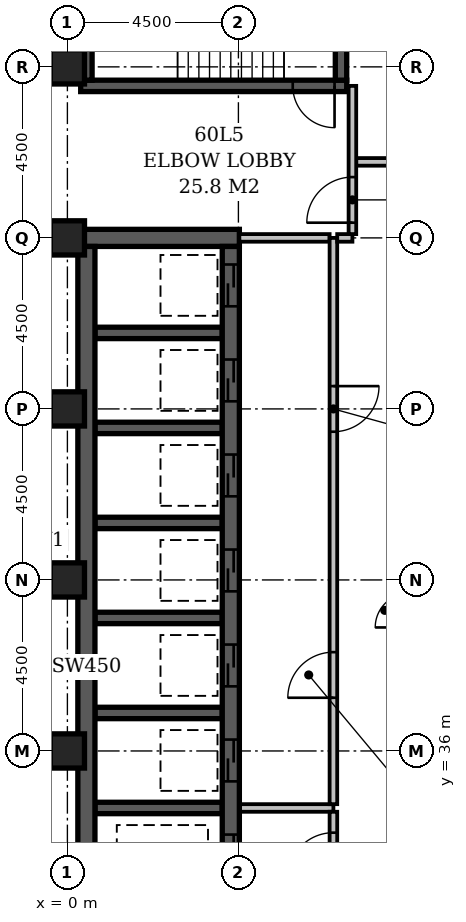
"""IFC4 building model, lengths in metres.
Left out: names, types, materials, properties, quantities, classifications, styles, units other than length and angle.
Written with IfcOpenShell. Run it as: python <this file> out.ifc"""

import sys

from ifc_helpers import new_model, si_unit, direction, frame, frame_2d, origin, origin_2d, place, context, subcontext, project, spatial, rectangle, extrude, element, fill, save


model = new_model("IFC4")
c1 = context("Model", 3, precision=1e-05, world=origin(), true_north=direction((0.0, 1.0)))
c2 = subcontext(c1, "Body", "Model", "MODEL_VIEW")
j1 = project(units=[si_unit("LENGTHUNIT", "METRE"), si_unit("PLANEANGLEUNIT", "RADIAN")], contexts=[c1])
p1 = place(None, origin())
s1 = spatial("IfcSite", under=j1, at=p1, CompositionType="ELEMENT")
p2 = place(p1, origin())
s2 = spatial("IfcBuilding", under=s1, at=p2, CompositionType="ELEMENT")
p3 = place(p2, frame((0.0, 0.0, 233.0)))
s3 = spatial("IfcBuildingStorey", under=s2, at=p3, CompositionType="ELEMENT", Elevation=233.0)
p4 = place(p3, frame((0.275, 49.5, -0.35), z_axis=(0.0, 0.0, 1.0), x_axis=(1.0, 0.0, 0.0)))
e1 = element("IfcWall", 1, at=p4, inside=s3, PredefinedType="SHEAR", context=c2, shape_type="SweptSolid", body=[
    extrude(rectangle(XDim=4.25, YDim=0.45, at=frame_2d((2.125, 0.0))), origin(), (0.0, 0.0, 1.0), 3.65),
])
p5 = place(p3, frame((0.35, 53.5, -0.35), z_axis=(0.0, 0.0, 1.0), x_axis=(1.0, 0.0, 0.0)))
e2 = element("IfcWall", 2, at=p5, inside=s3, PredefinedType="SHEAR", context=c2, shape_type="SweptSolid", body=[
    extrude(rectangle(XDim=7.0, YDim=0.3, at=frame_2d((3.5, 0.0))), origin(), (0.0, 0.0, 1.0), 3.65),
])
p6 = place(p5, frame((5.58, 0.0, 0.35)))
e3 = element("IfcOpeningElement", 3, at=p6, cuts=e2, PredefinedType="OPENING", context=c2, shape_type="SweptSolid", body=[
    extrude(rectangle(XDim=1.1, YDim=2.1, at=frame_2d((0.55, 1.05))), frame((0.0, 0.162, 0.0), z_axis=(0.0, -1.0, 0.0), x_axis=(1.0, 0.0, 0.0)), (0.0, 0.0, 1.0), 0.324),
])
p7 = place(p3, frame((0.5, 27.15, -0.35), z_axis=(0.0, 0.0, 1.0), x_axis=(0.0, 1.0, 0.0)))
e4 = element("IfcWall", 4, at=p7, inside=s3, PredefinedType="SHEAR", context=c2, shape_type="SweptSolid", body=[
    extrude(rectangle(XDim=22.125, YDim=0.45, at=frame_2d((11.062, 0.0))), origin(), (0.0, 0.0, 1.0), 3.65),
])
p8 = place(p3, frame((0.5, 53.65, -0.35), z_axis=(0.0, 0.0, 1.0), x_axis=(0.0, 1.0, 0.0)))
e5 = element("IfcWall", 5, at=p8, inside=s3, PredefinedType="SHEAR", context=c2, shape_type="SweptSolid", body=[
    extrude(rectangle(XDim=4.2, YDim=0.3, at=frame_2d((2.1, 0.0))), origin(), (0.0, 0.0, 1.0), 3.65),
])
for number, where, z_axis, x_axis in (
    (6, (0.725, 34.5, -0.35), (0.0, 0.0, 1.0), (1.0, 0.0, 0.0)),
    (7, (0.725, 37.0, -0.35), (0.0, 0.0, 1.0), (1.0, 0.0, 0.0)),
    (8, (0.725, 39.5, -0.35), (0.0, 0.0, 1.0), (1.0, 0.0, 0.0)),
    (9, (0.725, 42.0, -0.35), (0.0, 0.0, 1.0), (1.0, 0.0, 0.0)),
    (10, (0.725, 44.5, -0.35), (0.0, 0.0, 1.0), (1.0, 0.0, 0.0)),
    (11, (0.725, 47.0, -0.35), (0.0, 0.0, 1.0), (1.0, 0.0, 0.0)),
):
    element("IfcWall", number, at=place(p3, frame(where, z_axis=z_axis, x_axis=x_axis)), inside=s3, PredefinedType="SHEAR", context=c2, shape_type="SweptSolid", body=[
        extrude(rectangle(XDim=3.35, YDim=0.3, at=frame_2d((1.675, 0.0))), origin(), (0.0, 0.0, 1.0), 3.65),
    ])
p9 = place(p3, frame((4.3, 27.15, -0.35), z_axis=(0.0, 0.0, 1.0), x_axis=(0.0, 1.0, 0.0)))
e12 = element("IfcWall", 12, at=p9, inside=s3, PredefinedType="SHEAR", context=c2, shape_type="SweptSolid", body=[
    extrude(rectangle(XDim=22.125, YDim=0.45, at=frame_2d((11.062, 0.0))), origin(), (0.0, 0.0, 1.0), 3.65),
])
p10 = place(p9, frame((3.05, 0.0, 0.35)))
e13 = element("IfcOpeningElement", 13, at=p10, cuts=e12, PredefinedType="OPENING", context=c2, shape_type="SweptSolid", body=[
    extrude(rectangle(XDim=1.1, YDim=2.1, at=frame_2d((0.55, 1.05))), frame((0.0, 0.237, 0.0), z_axis=(0.0, -1.0, 0.0), x_axis=(1.0, 0.0, 0.0)), (0.0, 0.0, 1.0), 0.474),
])
p11 = place(p9, frame((0.55, 0.0, 0.35)))
e14 = element("IfcOpeningElement", 14, at=p11, cuts=e12, PredefinedType="OPENING", context=c2, shape_type="SweptSolid", body=[
    extrude(rectangle(XDim=1.1, YDim=2.1, at=frame_2d((0.55, 1.05))), frame((0.0, 0.237, 0.0), z_axis=(0.0, -1.0, 0.0), x_axis=(1.0, 0.0, 0.0)), (0.0, 0.0, 1.0), 0.474),
])
p12 = place(p9, frame((20.55, 0.0, 0.35)))
e15 = element("IfcOpeningElement", 15, at=p12, cuts=e12, PredefinedType="OPENING", context=c2, shape_type="SweptSolid", body=[
    extrude(rectangle(XDim=1.1, YDim=2.1, at=frame_2d((0.55, 1.05))), frame((0.0, 0.237, 0.0), z_axis=(0.0, -1.0, 0.0), x_axis=(1.0, 0.0, 0.0)), (0.0, 0.0, 1.0), 0.474),
])
p13 = place(p9, frame((18.05, 0.0, 0.35)))
e16 = element("IfcOpeningElement", 16, at=p13, cuts=e12, PredefinedType="OPENING", context=c2, shape_type="SweptSolid", body=[
    extrude(rectangle(XDim=1.1, YDim=2.1, at=frame_2d((0.55, 1.05))), frame((0.0, 0.237, 0.0), z_axis=(0.0, -1.0, 0.0), x_axis=(1.0, 0.0, 0.0)), (0.0, 0.0, 1.0), 0.474),
])
p14 = place(p9, frame((15.55, 0.0, 0.35)))
e17 = element("IfcOpeningElement", 17, at=p14, cuts=e12, PredefinedType="OPENING", context=c2, shape_type="SweptSolid", body=[
    extrude(rectangle(XDim=1.1, YDim=2.1, at=frame_2d((0.55, 1.05))), frame((0.0, 0.237, 0.0), z_axis=(0.0, -1.0, 0.0), x_axis=(1.0, 0.0, 0.0)), (0.0, 0.0, 1.0), 0.474),
])
p15 = place(p9, frame((13.05, 0.0, 0.35)))
e18 = element("IfcOpeningElement", 18, at=p15, cuts=e12, PredefinedType="OPENING", context=c2, shape_type="SweptSolid", body=[
    extrude(rectangle(XDim=1.1, YDim=2.1, at=frame_2d((0.55, 1.05))), frame((0.0, 0.237, 0.0), z_axis=(0.0, -1.0, 0.0), x_axis=(1.0, 0.0, 0.0)), (0.0, 0.0, 1.0), 0.474),
])
p16 = place(p9, frame((10.55, 0.0, 0.35)))
e19 = element("IfcOpeningElement", 19, at=p16, cuts=e12, PredefinedType="OPENING", context=c2, shape_type="SweptSolid", body=[
    extrude(rectangle(XDim=1.1, YDim=2.1, at=frame_2d((0.55, 1.05))), frame((0.0, 0.237, 0.0), z_axis=(0.0, -1.0, 0.0), x_axis=(1.0, 0.0, 0.0)), (0.0, 0.0, 1.0), 0.474),
])
p17 = place(p9, frame((8.05, 0.0, 0.35)))
e20 = element("IfcOpeningElement", 20, at=p17, cuts=e12, PredefinedType="OPENING", context=c2, shape_type="SweptSolid", body=[
    extrude(rectangle(XDim=1.1, YDim=2.1, at=frame_2d((0.55, 1.05))), frame((0.0, 0.237, 0.0), z_axis=(0.0, -1.0, 0.0), x_axis=(1.0, 0.0, 0.0)), (0.0, 0.0, 1.0), 0.474),
])
p18 = place(p9, frame((5.55, 0.0, 0.35)))
e21 = element("IfcOpeningElement", 21, at=p18, cuts=e12, PredefinedType="OPENING", context=c2, shape_type="SweptSolid", body=[
    extrude(rectangle(XDim=1.1, YDim=2.1, at=frame_2d((0.55, 1.05))), frame((0.0, 0.237, 0.0), z_axis=(0.0, -1.0, 0.0), x_axis=(1.0, 0.0, 0.0)), (0.0, 0.0, 1.0), 0.474),
])
p19 = place(p3, frame((7.2, 53.65, -0.35), z_axis=(0.0, 0.0, 1.0), x_axis=(0.0, 1.0, 0.0)))
e22 = element("IfcWall", 22, at=p19, inside=s3, PredefinedType="SHEAR", context=c2, shape_type="SweptSolid", body=[
    extrude(rectangle(XDim=4.2, YDim=0.3, at=frame_2d((2.1, 0.0))), origin(), (0.0, 0.0, 1.0), 3.65),
])
for number, where, z_axis, x_axis in (
    (23, (0.0, 36.0, -0.35), (0.0, 0.0, 1.0), (1.0, 0.0, 0.0)),
    (24, (0.0, 40.5, -0.35), (0.0, 0.0, 1.0), (1.0, 0.0, 0.0)),
    (25, (0.0, 45.0, -0.35), (0.0, 0.0, 1.0), (1.0, 0.0, 0.0)),
    (26, (0.0, 49.5, -0.35), (0.0, 0.0, 1.0), (1.0, 0.0, 0.0)),
    (27, (0.0, 54.0, -0.35), (0.0, 0.0, 1.0), (1.0, 0.0, 0.0)),
):
    element("IfcColumn", number, at=place(p3, frame(where, z_axis=z_axis, x_axis=x_axis)), inside=s3, PredefinedType="COLUMN", context=c2, shape_type="SweptSolid", body=[
        extrude(rectangle(XDim=0.9, YDim=0.9, at=origin_2d()), origin(), (0.0, 0.0, 1.0), 3.65),
    ])
p20 = place(p3, frame((4.545, 34.5, 0.0), z_axis=(0.0, 0.0, 1.0), x_axis=(1.0, 0.0, 0.0)))
e28 = element("IfcWall", 28, at=p20, inside=s3, PredefinedType="PARTITIONING", context=c2, shape_type="SweptSolid", body=[
    extrude(rectangle(XDim=2.455, YDim=0.2, at=frame_2d((1.228, 0.0))), origin(), (0.0, 0.0, 1.0), 3.3),
])
p21 = place(p3, frame((7.0, 34.6, 0.0), z_axis=(0.0, 0.0, 1.0), x_axis=(0.0, 1.0, 0.0)))
e29 = element("IfcWall", 29, at=p21, inside=s3, PredefinedType="PARTITIONING", context=c2, shape_type="SweptSolid", body=[
    extrude(rectangle(XDim=14.9, YDim=0.2, at=frame_2d((7.45, 0.0))), origin(), (0.0, 0.0, 1.0), 3.3),
])
p22 = place(p21, frame((2.8, 0.0, 0.0)))
e30 = element("IfcOpeningElement", 30, at=p22, cuts=e29, PredefinedType="OPENING", context=c2, shape_type="SweptSolid", body=[
    extrude(rectangle(XDim=1.2, YDim=2.1, at=frame_2d((0.6, 1.05))), frame((0.0, 0.112, 0.0), z_axis=(0.0, -1.0, 0.0), x_axis=(1.0, 0.0, 0.0)), (0.0, 0.0, 1.0), 0.224),
])
p23 = place(p21, frame((9.8, 0.0, 0.0)))
e31 = element("IfcOpeningElement", 31, at=p23, cuts=e29, PredefinedType="OPENING", context=c2, shape_type="SweptSolid", body=[
    extrude(rectangle(XDim=1.2, YDim=2.1, at=frame_2d((0.6, 1.05))), frame((0.0, 0.112, 0.0), z_axis=(0.0, -1.0, 0.0), x_axis=(1.0, 0.0, 0.0)), (0.0, 0.0, 1.0), 0.224),
])
p24 = place(p3, frame((4.525, 49.5, 0.0), z_axis=(0.0, 0.0, 1.0), x_axis=(1.0, 0.0, 0.0)))
e32 = element("IfcWall", 32, at=p24, inside=s3, PredefinedType="PARTITIONING", context=c2, shape_type="SweptSolid", body=[
    extrude(rectangle(XDim=2.375, YDim=0.2, at=frame_2d((1.188, 0.0))), origin(), (0.0, 0.0, 1.0), 3.3),
])
p25 = place(p3, frame((7.0, 32.1, 0.0), z_axis=(0.0, 0.0, 1.0), x_axis=(0.0, 1.0, 0.0)))
e33 = element("IfcWall", 33, at=p25, inside=s3, PredefinedType="PARTITIONING", context=c2, shape_type="SweptSolid", body=[
    extrude(rectangle(XDim=2.3, YDim=0.2, at=frame_2d((1.15, 0.0))), origin(), (0.0, 0.0, 1.0), 3.3),
])
p26 = place(p25, frame((0.55, 0.0, 0.0)))
e34 = element("IfcOpeningElement", 34, at=p26, cuts=e33, PredefinedType="OPENING", context=c2, shape_type="SweptSolid", body=[
    extrude(rectangle(XDim=1.2, YDim=2.1, at=frame_2d((0.6, 1.05))), frame((0.0, 0.112, 0.0), z_axis=(0.0, -1.0, 0.0), x_axis=(1.0, 0.0, 0.0)), (0.0, 0.0, 1.0), 0.224),
])
p27 = place(p3, frame((7.1, 49.5, 0.0), z_axis=(0.0, 0.0, 1.0), x_axis=(1.0, 0.0, 0.0)))
e35 = element("IfcWall", 35, at=p27, inside=s3, PredefinedType="PARTITIONING", context=c2, shape_type="SweptSolid", body=[
    extrude(rectangle(XDim=0.4, YDim=0.2, at=frame_2d((0.2, 0.0))), origin(), (0.0, 0.0, 1.0), 3.3),
])
p28 = place(p3, frame((7.5, 49.6, 0.0), z_axis=(0.0, 0.0, 1.0), x_axis=(0.0, 1.0, 0.0)))
e36 = element("IfcWall", 36, at=p28, inside=s3, PredefinedType="PARTITIONING", context=c2, shape_type="SweptSolid", body=[
    extrude(rectangle(XDim=3.9, YDim=0.2, at=frame_2d((1.95, 0.0))), origin(), (0.0, 0.0, 1.0), 3.3),
])
p29 = place(p28, frame((0.3, 0.0, 0.0)))
e37 = element("IfcOpeningElement", 37, at=p29, cuts=e36, PredefinedType="OPENING", context=c2, shape_type="SweptSolid", body=[
    extrude(rectangle(XDim=1.2, YDim=2.1, at=frame_2d((0.6, 1.05))), frame((0.0, 0.112, 0.0), z_axis=(0.0, -1.0, 0.0), x_axis=(1.0, 0.0, 0.0)), (0.0, 0.0, 1.0), 0.224),
])
p30 = place(p3, frame((7.6, 51.5, 0.0), z_axis=(0.0, 0.0, 1.0), x_axis=(1.0, 0.0, 0.0)))
e38 = element("IfcWall", 38, at=p30, inside=s3, PredefinedType="PARTITIONING", context=c2, shape_type="SweptSolid", body=[
    extrude(rectangle(XDim=15.3, YDim=0.2, at=frame_2d((7.65, 0.0))), origin(), (0.0, 0.0, 1.0), 3.3),
])
p31 = place(p30, frame((7.2, 0.0, 0.0)))
e39 = element("IfcOpeningElement", 39, at=p31, cuts=e38, PredefinedType="OPENING", context=c2, shape_type="SweptSolid", body=[
    extrude(rectangle(XDim=0.9, YDim=2.1, at=frame_2d((0.45, 1.05))), frame((0.0, 0.112, 0.0), z_axis=(0.0, -1.0, 0.0), x_axis=(1.0, 0.0, 0.0)), (0.0, 0.0, 1.0), 0.224),
])
p32 = place(p29, origin())
e40 = element("IfcDoor", 40, at=p32, inside=s3, OperationType="SINGLE_SWING_LEFT", PredefinedType="DOOR", context=c2, shape_type="SweptSolid", body=[
    extrude(rectangle(XDim=1.2, YDim=2.1, at=frame_2d((0.6, 1.05))), frame((0.0, 0.025, 0.0), z_axis=(0.0, -1.0, 0.0), x_axis=(1.0, 0.0, 0.0)), (0.0, 0.0, 1.0), 0.05),
])
fill(e37, e40)
p33 = place(p12, origin())
e41 = element("IfcDoor", 41, at=p33, inside=s3, OperationType="SLIDING_TO_LEFT", PredefinedType="DOOR", context=c2, shape_type="SweptSolid", body=[
    extrude(rectangle(XDim=1.1, YDim=2.1, at=frame_2d((0.55, 1.05))), frame((0.0, 0.025, 0.0), z_axis=(0.0, -1.0, 0.0), x_axis=(1.0, 0.0, 0.0)), (0.0, 0.0, 1.0), 0.05),
])
fill(e15, e41)
p34 = place(p13, origin())
e42 = element("IfcDoor", 42, at=p34, inside=s3, OperationType="SLIDING_TO_LEFT", PredefinedType="DOOR", context=c2, shape_type="SweptSolid", body=[
    extrude(rectangle(XDim=1.1, YDim=2.1, at=frame_2d((0.55, 1.05))), frame((0.0, 0.025, 0.0), z_axis=(0.0, -1.0, 0.0), x_axis=(1.0, 0.0, 0.0)), (0.0, 0.0, 1.0), 0.05),
])
fill(e16, e42)
p35 = place(p14, origin())
e43 = element("IfcDoor", 43, at=p35, inside=s3, OperationType="SLIDING_TO_LEFT", PredefinedType="DOOR", context=c2, shape_type="SweptSolid", body=[
    extrude(rectangle(XDim=1.1, YDim=2.1, at=frame_2d((0.55, 1.05))), frame((0.0, 0.025, 0.0), z_axis=(0.0, -1.0, 0.0), x_axis=(1.0, 0.0, 0.0)), (0.0, 0.0, 1.0), 0.05),
])
fill(e17, e43)
p36 = place(p15, origin())
e44 = element("IfcDoor", 44, at=p36, inside=s3, OperationType="SLIDING_TO_LEFT", PredefinedType="DOOR", context=c2, shape_type="SweptSolid", body=[
    extrude(rectangle(XDim=1.1, YDim=2.1, at=frame_2d((0.55, 1.05))), frame((0.0, 0.025, 0.0), z_axis=(0.0, -1.0, 0.0), x_axis=(1.0, 0.0, 0.0)), (0.0, 0.0, 1.0), 0.05),
])
fill(e18, e44)
p37 = place(p16, origin())
e45 = element("IfcDoor", 45, at=p37, inside=s3, OperationType="SLIDING_TO_LEFT", PredefinedType="DOOR", context=c2, shape_type="SweptSolid", body=[
    extrude(rectangle(XDim=1.1, YDim=2.1, at=frame_2d((0.55, 1.05))), frame((0.0, 0.025, 0.0), z_axis=(0.0, -1.0, 0.0), x_axis=(1.0, 0.0, 0.0)), (0.0, 0.0, 1.0), 0.05),
])
fill(e19, e45)
p38 = place(p17, origin())
e46 = element("IfcDoor", 46, at=p38, inside=s3, OperationType="SLIDING_TO_LEFT", PredefinedType="DOOR", context=c2, shape_type="SweptSolid", body=[
    extrude(rectangle(XDim=1.1, YDim=2.1, at=frame_2d((0.55, 1.05))), frame((0.0, 0.025, 0.0), z_axis=(0.0, -1.0, 0.0), x_axis=(1.0, 0.0, 0.0)), (0.0, 0.0, 1.0), 0.05),
])
fill(e20, e46)
p39 = place(p22, origin())
e47 = element("IfcDoor", 47, at=p39, inside=s3, OperationType="SINGLE_SWING_LEFT", PredefinedType="DOOR", context=c2, shape_type="SweptSolid", body=[
    extrude(rectangle(XDim=1.2, YDim=2.1, at=frame_2d((0.6, 1.05))), frame((0.0, 0.025, 0.0), z_axis=(0.0, -1.0, 0.0), x_axis=(1.0, 0.0, 0.0)), (0.0, 0.0, 1.0), 0.05),
])
fill(e30, e47)
p40 = place(p23, origin())
e48 = element("IfcDoor", 48, at=p40, inside=s3, OperationType="SINGLE_SWING_RIGHT", PredefinedType="DOOR", context=c2, shape_type="SweptSolid", body=[
    extrude(rectangle(XDim=1.2, YDim=2.1, at=frame_2d((0.6, 1.05))), frame((0.0, 0.025, 0.0), z_axis=(0.0, -1.0, 0.0), x_axis=(1.0, 0.0, 0.0)), (0.0, 0.0, 1.0), 0.05),
])
fill(e31, e48)
p41 = place(p26, origin())
e49 = element("IfcDoor", 49, at=p41, inside=s3, OperationType="SINGLE_SWING_LEFT", PredefinedType="DOOR", context=c2, shape_type="SweptSolid", body=[
    extrude(rectangle(XDim=1.2, YDim=2.1, at=frame_2d((0.6, 1.05))), frame((0.0, 0.025, 0.0), z_axis=(0.0, -1.0, 0.0), x_axis=(1.0, 0.0, 0.0)), (0.0, 0.0, 1.0), 0.05),
])
fill(e34, e49)
p42 = place(p18, origin())
e50 = element("IfcDoor", 50, at=p42, inside=s3, OperationType="SLIDING_TO_LEFT", PredefinedType="DOOR", context=c2, shape_type="SweptSolid", body=[
    extrude(rectangle(XDim=1.1, YDim=2.1, at=frame_2d((0.55, 1.05))), frame((0.0, 0.025, 0.0), z_axis=(0.0, -1.0, 0.0), x_axis=(1.0, 0.0, 0.0)), (0.0, 0.0, 1.0), 0.05),
])
fill(e21, e50)
p43 = place(p6, origin())
e51 = element("IfcDoor", 51, at=p43, inside=s3, OperationType="SINGLE_SWING_RIGHT", PredefinedType="DOOR", context=c2, shape_type="SweptSolid", body=[
    extrude(rectangle(XDim=1.1, YDim=2.1, at=frame_2d((0.55, 1.05))), frame((0.0, 0.025, 0.0), z_axis=(0.0, -1.0, 0.0), x_axis=(1.0, 0.0, 0.0)), (0.0, 0.0, 1.0), 0.05),
])
fill(e3, e51)
save(model, sys.argv[1])
